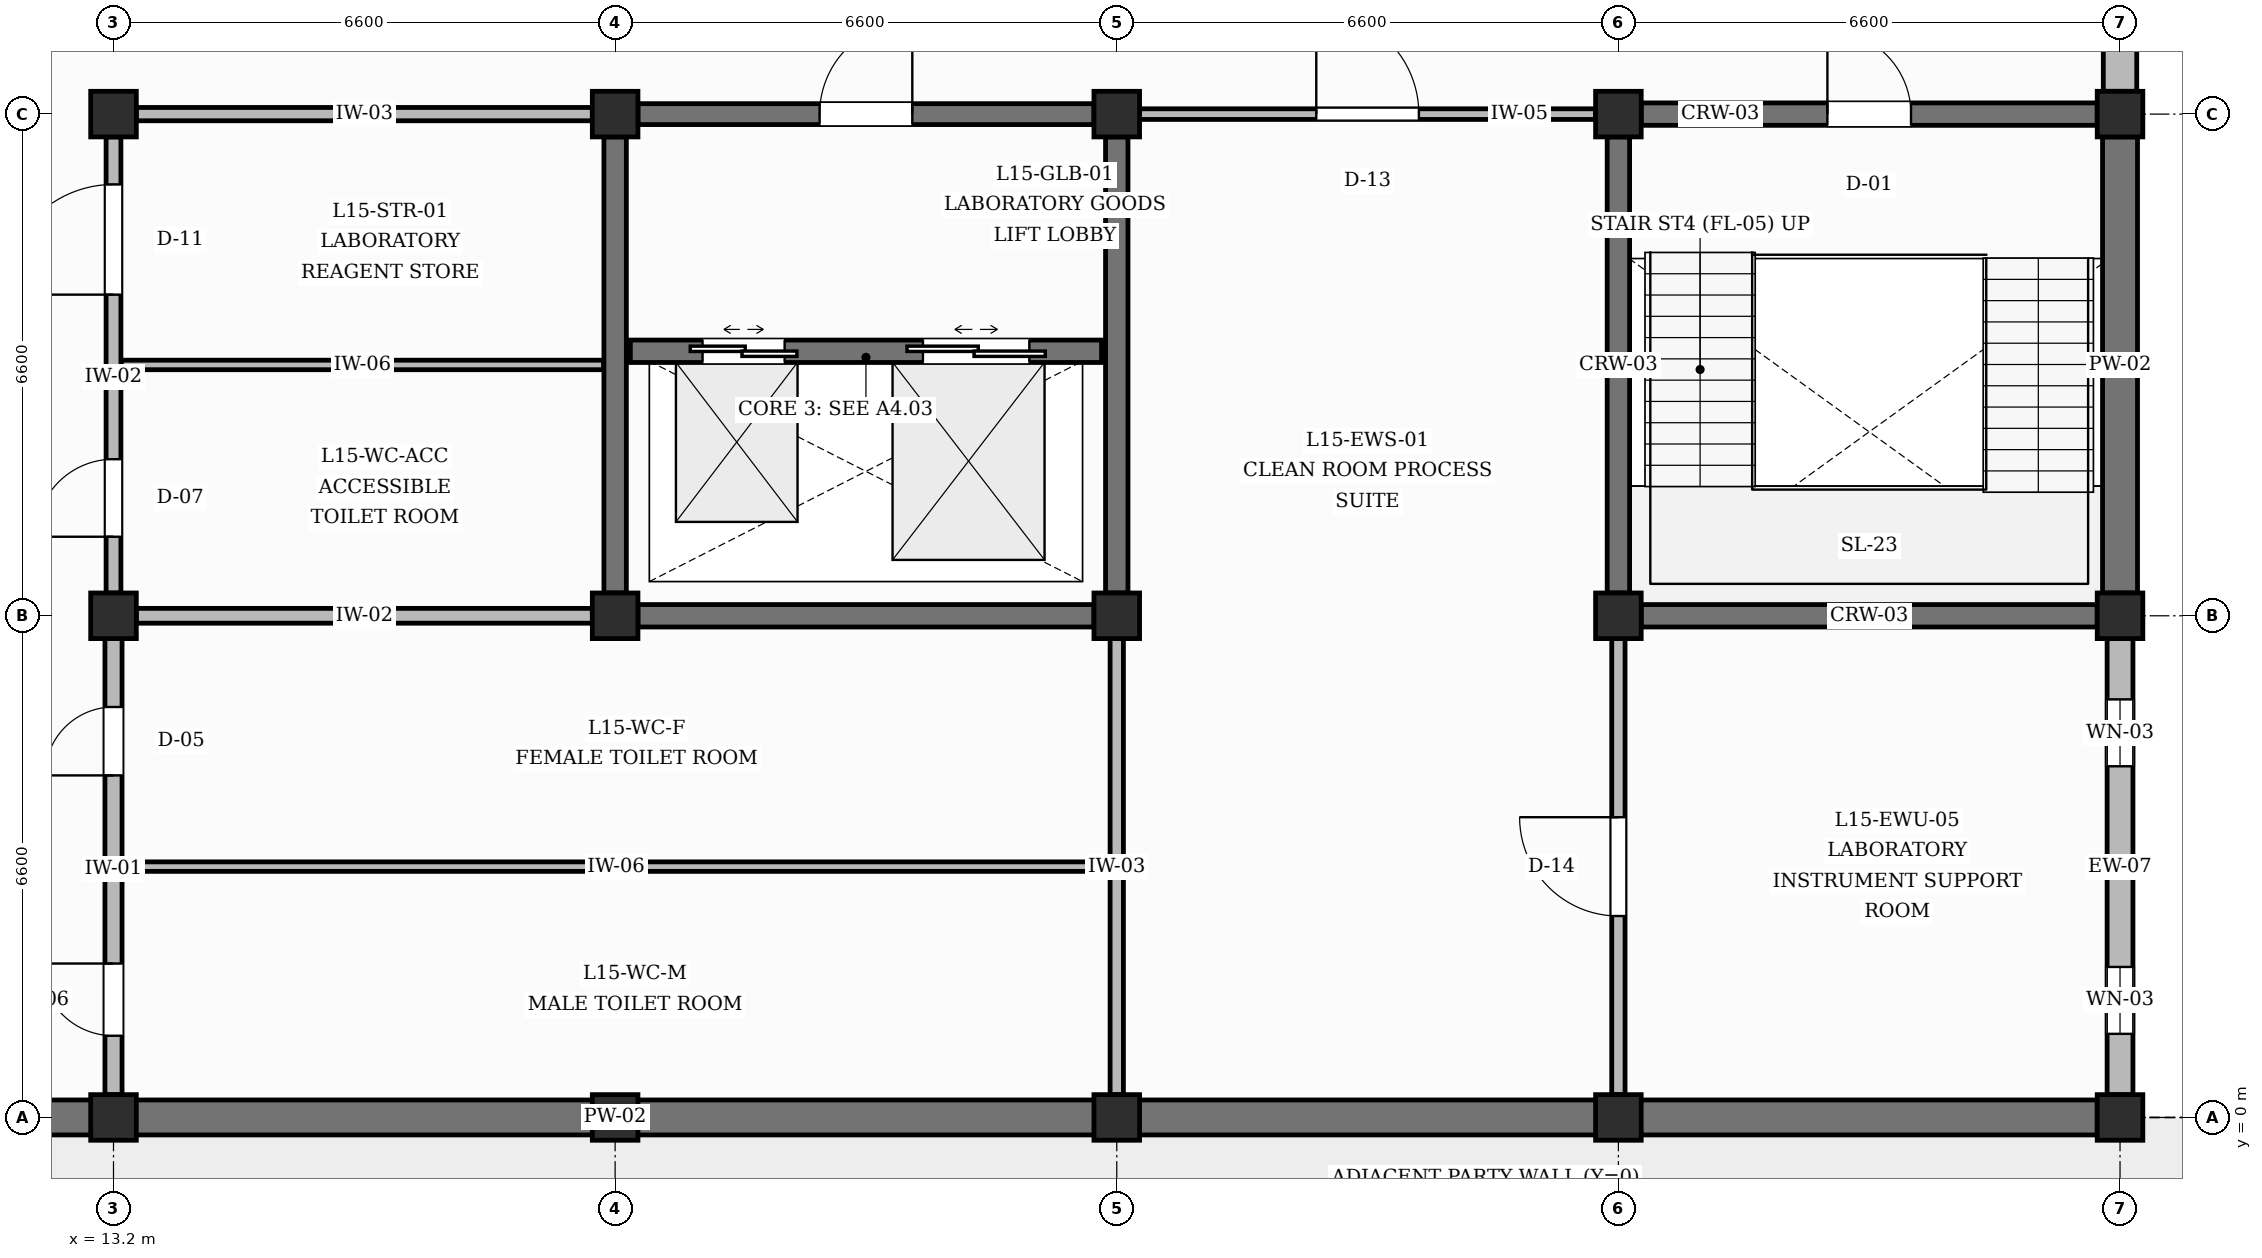
"""IFC4 building model, lengths in metres.
Left out: names, types, materials, properties, quantities, classifications, styles, units other than length and angle.
Written with IfcOpenShell. Run it as: python <this file> out.ifc"""

import sys

from ifc_helpers import new_model, si_unit, direction, frame, frame_2d, origin, origin_2d, place, context, subcontext, project, spatial, rectangle, extrude, element, fill, save


model = new_model("IFC4")
c1 = context("Model", 3, precision=1e-05, world=origin(), true_north=direction((0.0, 1.0)))
c2 = subcontext(c1, "Body", "Model", "MODEL_VIEW")
j1 = project(units=[si_unit("LENGTHUNIT", "METRE"), si_unit("PLANEANGLEUNIT", "RADIAN")], contexts=[c1])
p1 = place(None, origin())
s1 = spatial("IfcSite", under=j1, at=p1, CompositionType="ELEMENT")
p2 = place(p1, origin())
s2 = spatial("IfcBuilding", under=s1, at=p2, CompositionType="ELEMENT")
p3 = place(p2, frame((0.0, 0.0, 64.8)))
s3 = spatial("IfcBuildingStorey", under=s2, at=p3, CompositionType="ELEMENT", Elevation=64.8)
for number, where, z_axis, x_axis in (
    (1, (13.2, 0.0, 0.0), (0.0, 0.0, 1.0), (1.0, 0.0, 0.0)),
    (2, (13.2, 6.6, 0.0), (0.0, 0.0, 1.0), (1.0, 0.0, 0.0)),
    (3, (13.2, 13.2, 0.0), (0.0, 0.0, 1.0), (1.0, 0.0, 0.0)),
    (4, (19.8, 0.0, 0.0), (0.0, 0.0, 1.0), (1.0, 0.0, 0.0)),
    (5, (19.8, 6.6, 0.0), (0.0, 0.0, 1.0), (1.0, 0.0, 0.0)),
    (6, (19.8, 13.2, 0.0), (0.0, 0.0, 1.0), (1.0, 0.0, 0.0)),
    (7, (26.4, 0.0, 0.0), (0.0, 0.0, 1.0), (1.0, 0.0, 0.0)),
    (8, (26.4, 6.6, 0.0), (0.0, 0.0, 1.0), (1.0, 0.0, 0.0)),
    (9, (26.4, 13.2, 0.0), (0.0, 0.0, 1.0), (1.0, 0.0, 0.0)),
    (10, (33.0, 0.0, 0.0), (0.0, 0.0, 1.0), (1.0, 0.0, 0.0)),
    (11, (33.0, 6.6, 0.0), (0.0, 0.0, 1.0), (1.0, 0.0, 0.0)),
    (12, (33.0, 13.2, 0.0), (0.0, 0.0, 1.0), (1.0, 0.0, 0.0)),
    (13, (39.6, 0.0, 0.0), (0.0, 0.0, 1.0), (1.0, 0.0, 0.0)),
    (14, (39.6, 6.6, 0.0), (0.0, 0.0, 1.0), (1.0, 0.0, 0.0)),
    (15, (39.6, 13.2, 0.0), (0.0, 0.0, 1.0), (1.0, 0.0, 0.0)),
):
    element("IfcColumn", number, at=place(p3, frame(where, z_axis=z_axis, x_axis=x_axis)), inside=s3, PredefinedType="COLUMN", context=c2, shape_type="SweptSolid", body=[
        extrude(rectangle(XDim=0.6, YDim=0.6, at=origin_2d()), origin(), (0.0, 0.0, 1.0), 4.2),
    ])
for number, where, z_axis, x_axis in (
    (16, (6.9, 0.0, 0.0), (0.0, 0.0, 1.0), (1.0, 0.0, 0.0)),
    (17, (13.5, 0.0, 0.0), (0.0, 0.0, 1.0), (1.0, 0.0, 0.0)),
    (18, (20.1, 0.0, 0.0), (0.0, 0.0, 1.0), (1.0, 0.0, 0.0)),
    (19, (26.7, 0.0, 0.0), (0.0, 0.0, 1.0), (1.0, 0.0, 0.0)),
    (20, (33.3, 0.0, 0.0), (0.0, 0.0, 1.0), (1.0, 0.0, 0.0)),
):
    element("IfcWall", number, at=place(p3, frame(where, z_axis=z_axis, x_axis=x_axis)), inside=s3, PredefinedType="SOLIDWALL", context=c2, shape_type="SweptSolid", body=[
        extrude(rectangle(XDim=6.0, YDim=0.46, at=frame_2d((3.0, 0.0))), origin(), (0.0, 0.0, 1.0), 3.3),
    ])
p4 = place(p3, frame((39.6, 0.3, 0.0), z_axis=(0.0, 0.0, 1.0), x_axis=(0.0, 1.0, 0.0)))
e21 = element("IfcWall", 21, at=p4, inside=s3, PredefinedType="SOLIDWALL", context=c2, shape_type="SweptSolid", body=[
    extrude(rectangle(XDim=6.0, YDim=0.34, at=frame_2d((3.0, 0.0))), origin(), (0.0, 0.0, 1.0), 3.3),
])
p5 = place(p4, frame((0.8, 0.0, 0.95)))
e22 = element("IfcOpeningElement", 22, at=p5, cuts=e21, PredefinedType="OPENING", context=c2, shape_type="SweptSolid", body=[
    extrude(rectangle(XDim=0.88, YDim=1.74, at=frame_2d((0.44, 0.87))), frame((0.0, 0.18, 0.0), z_axis=(0.0, -1.0, 0.0), x_axis=(1.0, 0.0, 0.0)), (0.0, 0.0, 1.0), 0.36),
])
p6 = place(p4, frame((4.32, 0.0, 0.95)))
e23 = element("IfcOpeningElement", 23, at=p6, cuts=e21, PredefinedType="OPENING", context=c2, shape_type="SweptSolid", body=[
    extrude(rectangle(XDim=0.88, YDim=1.74, at=frame_2d((0.44, 0.87))), frame((0.0, 0.18, 0.0), z_axis=(0.0, -1.0, 0.0), x_axis=(1.0, 0.0, 0.0)), (0.0, 0.0, 1.0), 0.36),
])
p7 = place(p3, frame((39.6, 6.9, 0.0), z_axis=(0.0, 0.0, 1.0), x_axis=(0.0, 1.0, 0.0)))
e24 = element("IfcWall", 24, at=p7, inside=s3, PredefinedType="SOLIDWALL", context=c2, shape_type="SweptSolid", body=[
    extrude(rectangle(XDim=6.0, YDim=0.46, at=frame_2d((3.0, 0.0))), origin(), (0.0, 0.0, 1.0), 3.3),
])
p8 = place(p3, frame((39.6, 13.5, 0.0), z_axis=(0.0, 0.0, 1.0), x_axis=(0.0, 1.0, 0.0)))
e25 = element("IfcWall", 25, at=p8, inside=s3, PredefinedType="SOLIDWALL", context=c2, shape_type="SweptSolid", body=[
    extrude(rectangle(XDim=6.0, YDim=0.44, at=frame_2d((3.0, 0.0))), origin(), (0.0, 0.0, 1.0), 3.3),
])
p9 = place(p8, frame((0.8, 0.0, 0.95)))
e26 = element("IfcOpeningElement", 26, at=p9, cuts=e25, PredefinedType="OPENING", context=c2, shape_type="SweptSolid", body=[
    extrude(rectangle(XDim=0.88, YDim=1.96, at=frame_2d((0.44, 0.98))), frame((0.0, 0.23, 0.0), z_axis=(0.0, -1.0, 0.0), x_axis=(1.0, 0.0, 0.0)), (0.0, 0.0, 1.0), 0.46),
])
p10 = place(p8, frame((4.32, 0.0, 0.95)))
e27 = element("IfcOpeningElement", 27, at=p10, cuts=e25, PredefinedType="OPENING", context=c2, shape_type="SweptSolid", body=[
    extrude(rectangle(XDim=0.88, YDim=1.96, at=frame_2d((0.44, 0.98))), frame((0.0, 0.23, 0.0), z_axis=(0.0, -1.0, 0.0), x_axis=(1.0, 0.0, 0.0)), (0.0, 0.0, 1.0), 0.46),
])
p11 = place(p3, frame((33.3, 6.6, 0.0), z_axis=(0.0, 0.0, 1.0), x_axis=(1.0, 0.0, 0.0)))
e28 = element("IfcWall", 28, at=p11, inside=s3, PredefinedType="SHEAR", context=c2, shape_type="SweptSolid", body=[
    extrude(rectangle(XDim=6.0, YDim=0.295, at=frame_2d((3.0, 0.0))), origin(), (0.0, 0.0, 1.0), 3.3),
])
p12 = place(p3, frame((33.3, 13.2, 0.0), z_axis=(0.0, 0.0, 1.0), x_axis=(1.0, 0.0, 0.0)))
e29 = element("IfcWall", 29, at=p12, inside=s3, PredefinedType="SHEAR", context=c2, shape_type="SweptSolid", body=[
    extrude(rectangle(XDim=6.0, YDim=0.295, at=frame_2d((3.0, 0.0))), origin(), (0.0, 0.0, 1.0), 3.3),
])
p13 = place(p12, frame((2.45, 0.0, 0.0)))
e30 = element("IfcOpeningElement", 30, at=p13, cuts=e29, PredefinedType="OPENING", context=c2, shape_type="SweptSolid", body=[
    extrude(rectangle(XDim=1.1, YDim=2.15, at=frame_2d((0.55, 1.075))), frame((0.0, 0.157, 0.0), z_axis=(0.0, -1.0, 0.0), x_axis=(1.0, 0.0, 0.0)), (0.0, 0.0, 1.0), 0.315),
])
for number, where, z_axis, x_axis in (
    (31, (33.0, 6.9, 0.0), (0.0, 0.0, 1.0), (0.0, 1.0, 0.0)),
    (32, (20.1, 6.6, 0.0), (0.0, 0.0, 1.0), (1.0, 0.0, 0.0)),
    (33, (19.8, 6.9, 0.0), (0.0, 0.0, 1.0), (0.0, 1.0, 0.0)),
    (34, (26.4, 6.9, 0.0), (0.0, 0.0, 1.0), (0.0, 1.0, 0.0)),
):
    element("IfcWall", number, at=place(p3, frame(where, z_axis=z_axis, x_axis=x_axis)), inside=s3, PredefinedType="SHEAR", context=c2, shape_type="SweptSolid", body=[
        extrude(rectangle(XDim=6.0, YDim=0.295, at=frame_2d((3.0, 0.0))), origin(), (0.0, 0.0, 1.0), 3.3),
    ])
p14 = place(p3, frame((20.1, 13.2, 0.0), z_axis=(0.0, 0.0, 1.0), x_axis=(1.0, 0.0, 0.0)))
e35 = element("IfcWall", 35, at=p14, inside=s3, PredefinedType="SHEAR", context=c2, shape_type="SweptSolid", body=[
    extrude(rectangle(XDim=6.0, YDim=0.275, at=frame_2d((3.0, 0.0))), origin(), (0.0, 0.0, 1.0), 3.3),
])
p15 = place(p14, frame((2.39, 0.0, 0.0)))
e36 = element("IfcOpeningElement", 36, at=p15, cuts=e35, PredefinedType="OPENING", context=c2, shape_type="SweptSolid", body=[
    extrude(rectangle(XDim=1.22, YDim=2.15, at=frame_2d((0.61, 1.075))), frame((0.0, 0.147, 0.0), z_axis=(0.0, -1.0, 0.0), x_axis=(1.0, 0.0, 0.0)), (0.0, 0.0, 1.0), 0.295),
])
p16 = place(p3, frame((20.0, 10.08, 0.0), z_axis=(0.0, 0.0, 1.0), x_axis=(1.0, 0.0, 0.0)))
e37 = element("IfcWall", 37, at=p16, inside=s3, PredefinedType="SHEAR", context=c2, shape_type="SweptSolid", body=[
    extrude(rectangle(XDim=6.2, YDim=0.295, at=frame_2d((3.1, 0.0))), origin(), (0.0, 0.0, 1.0), 3.9),
])
p17 = place(p16, frame((0.95, 0.0, 0.0)))
e38 = element("IfcOpeningElement", 38, at=p17, cuts=e37, PredefinedType="OPENING", context=c2, shape_type="SweptSolid", body=[
    extrude(rectangle(XDim=1.08, YDim=2.15, at=frame_2d((0.54, 1.075))), frame((0.0, 0.157, 0.0), z_axis=(0.0, -1.0, 0.0), x_axis=(1.0, 0.0, 0.0)), (0.0, 0.0, 1.0), 0.315),
])
p18 = place(p16, frame((3.85, 0.0, 0.0)))
e39 = element("IfcOpeningElement", 39, at=p18, cuts=e37, PredefinedType="OPENING", context=c2, shape_type="SweptSolid", body=[
    extrude(rectangle(XDim=1.4, YDim=2.35, at=frame_2d((0.7, 1.175))), frame((0.0, 0.157, 0.0), z_axis=(0.0, -1.0, 0.0), x_axis=(1.0, 0.0, 0.0)), (0.0, 0.0, 1.0), 0.315),
])
p19 = place(p3, frame((13.2, 0.3, 0.0), z_axis=(0.0, 0.0, 1.0), x_axis=(0.0, 1.0, 0.0)))
e40 = element("IfcWall", 40, at=p19, inside=s3, PredefinedType="PARTITIONING", context=c2, shape_type="SweptSolid", body=[
    extrude(rectangle(XDim=6.0, YDim=0.225, at=frame_2d((3.0, 0.0))), origin(), (0.0, 0.0, 1.0), 3.3),
])
p20 = place(p19, frame((0.775, 0.0, 0.0)))
e41 = element("IfcOpeningElement", 41, at=p20, cuts=e40, PredefinedType="OPENING", context=c2, shape_type="SweptSolid", body=[
    extrude(rectangle(XDim=0.95, YDim=2.1, at=frame_2d((0.475, 1.05))), frame((0.0, 0.123, 0.0), z_axis=(0.0, -1.0, 0.0), x_axis=(1.0, 0.0, 0.0)), (0.0, 0.0, 1.0), 0.245),
])
p21 = place(p19, frame((4.2, 0.0, 0.0)))
e42 = element("IfcOpeningElement", 42, at=p21, cuts=e40, PredefinedType="OPENING", context=c2, shape_type="SweptSolid", body=[
    extrude(rectangle(XDim=0.9, YDim=2.1, at=frame_2d((0.45, 1.05))), frame((0.0, 0.123, 0.0), z_axis=(0.0, -1.0, 0.0), x_axis=(1.0, 0.0, 0.0)), (0.0, 0.0, 1.0), 0.245),
])
p22 = place(p3, frame((26.4, 0.3, 0.0), z_axis=(0.0, 0.0, 1.0), x_axis=(0.0, 1.0, 0.0)))
e43 = element("IfcWall", 43, at=p22, inside=s3, PredefinedType="PARTITIONING", context=c2, shape_type="SweptSolid", body=[
    extrude(rectangle(XDim=6.0, YDim=0.175, at=frame_2d((3.0, 0.0))), origin(), (0.0, 0.0, 1.0), 3.3),
])
p23 = place(p3, frame((13.5, 6.6, 0.0), z_axis=(0.0, 0.0, 1.0), x_axis=(1.0, 0.0, 0.0)))
e44 = element("IfcWall", 44, at=p23, inside=s3, PredefinedType="PARTITIONING", context=c2, shape_type="SweptSolid", body=[
    extrude(rectangle(XDim=6.0, YDim=0.195, at=frame_2d((3.0, 0.0))), origin(), (0.0, 0.0, 1.0), 3.3),
])
p24 = place(p3, frame((13.2, 6.9, 0.0), z_axis=(0.0, 0.0, 1.0), x_axis=(0.0, 1.0, 0.0)))
e45 = element("IfcWall", 45, at=p24, inside=s3, PredefinedType="PARTITIONING", context=c2, shape_type="SweptSolid", body=[
    extrude(rectangle(XDim=6.0, YDim=0.195, at=frame_2d((3.0, 0.0))), origin(), (0.0, 0.0, 1.0), 3.3),
])
p25 = place(p24, frame((0.74, 0.0, 0.0)))
e46 = element("IfcOpeningElement", 46, at=p25, cuts=e45, PredefinedType="OPENING", context=c2, shape_type="SweptSolid", body=[
    extrude(rectangle(XDim=1.02, YDim=2.15, at=frame_2d((0.51, 1.075))), frame((0.0, 0.107, 0.0), z_axis=(0.0, -1.0, 0.0), x_axis=(1.0, 0.0, 0.0)), (0.0, 0.0, 1.0), 0.215),
])
p26 = place(p24, frame((3.925, 0.0, 0.0)))
e47 = element("IfcOpeningElement", 47, at=p26, cuts=e45, PredefinedType="OPENING", context=c2, shape_type="SweptSolid", body=[
    extrude(rectangle(XDim=1.45, YDim=2.25, at=frame_2d((0.725, 1.125))), frame((0.0, 0.107, 0.0), z_axis=(0.0, -1.0, 0.0), x_axis=(1.0, 0.0, 0.0)), (0.0, 0.0, 1.0), 0.215),
])
p27 = place(p3, frame((13.5, 13.2, 0.0), z_axis=(0.0, 0.0, 1.0), x_axis=(1.0, 0.0, 0.0)))
e48 = element("IfcWall", 48, at=p27, inside=s3, PredefinedType="PARTITIONING", context=c2, shape_type="SweptSolid", body=[
    extrude(rectangle(XDim=6.0, YDim=0.175, at=frame_2d((3.0, 0.0))), origin(), (0.0, 0.0, 1.0), 3.3),
])
p28 = place(p3, frame((33.0, 0.3, 0.0), z_axis=(0.0, 0.0, 1.0), x_axis=(0.0, 1.0, 0.0)))
e49 = element("IfcWall", 49, at=p28, inside=s3, PredefinedType="PARTITIONING", context=c2, shape_type="SweptSolid", body=[
    extrude(rectangle(XDim=6.0, YDim=0.175, at=frame_2d((3.0, 0.0))), origin(), (0.0, 0.0, 1.0), 3.3),
])
p29 = place(p28, frame((2.35, 0.0, 0.0)))
e50 = element("IfcOpeningElement", 50, at=p29, cuts=e49, PredefinedType="OPENING", context=c2, shape_type="SweptSolid", body=[
    extrude(rectangle(XDim=1.3, YDim=2.3, at=frame_2d((0.65, 1.15))), frame((0.0, 0.097, 0.0), z_axis=(0.0, -1.0, 0.0), x_axis=(1.0, 0.0, 0.0)), (0.0, 0.0, 1.0), 0.195),
])
p30 = place(p3, frame((26.7, 13.2, 0.0), z_axis=(0.0, 0.0, 1.0), x_axis=(1.0, 0.0, 0.0)))
e51 = element("IfcWall", 51, at=p30, inside=s3, PredefinedType="PARTITIONING", context=c2, shape_type="SweptSolid", body=[
    extrude(rectangle(XDim=6.0, YDim=0.14, at=frame_2d((3.0, 0.0))), origin(), (0.0, 0.0, 1.0), 3.3),
])
p31 = place(p30, frame((2.325, 0.0, 0.0)))
e52 = element("IfcOpeningElement", 52, at=p31, cuts=e51, PredefinedType="OPENING", context=c2, shape_type="SweptSolid", body=[
    extrude(rectangle(XDim=1.35, YDim=2.3, at=frame_2d((0.675, 1.15))), frame((0.0, 0.08, 0.0), z_axis=(0.0, -1.0, 0.0), x_axis=(1.0, 0.0, 0.0)), (0.0, 0.0, 1.0), 0.16),
])
p32 = place(p3, frame((13.317, 3.3, 0.0), z_axis=(0.0, 0.0, 1.0), x_axis=(1.0, 0.0, 0.0)))
e53 = element("IfcWall", 53, at=p32, inside=s3, PredefinedType="PARTITIONING", context=c2, shape_type="SweptSolid", body=[
    extrude(rectangle(XDim=12.99, YDim=0.125, at=frame_2d((6.495, 0.0))), origin(), (0.0, 0.0, 1.0), 3.9),
])
p33 = place(p3, frame((13.302, 9.9, 0.0), z_axis=(0.0, 0.0, 1.0), x_axis=(1.0, 0.0, 0.0)))
e54 = element("IfcWall", 54, at=p33, inside=s3, PredefinedType="PARTITIONING", context=c2, shape_type="SweptSolid", body=[
    extrude(rectangle(XDim=6.345, YDim=0.125, at=frame_2d((3.172, 0.0))), origin(), (0.0, 0.0, 1.0), 3.9),
])
p34 = place(p5, origin())
e55 = element("IfcWindow", 55, at=p34, inside=s3, PartitioningType="SINGLE_PANEL", PredefinedType="WINDOW", context=c2, shape_type="SweptSolid", body=[
    extrude(rectangle(XDim=0.88, YDim=1.74, at=frame_2d((0.44, 0.87))), frame((0.0, 0.03, 0.0), z_axis=(0.0, -1.0, 0.0), x_axis=(1.0, 0.0, 0.0)), (0.0, 0.0, 1.0), 0.06),
])
fill(e22, e55)
p35 = place(p6, origin())
e56 = element("IfcWindow", 56, at=p35, inside=s3, PartitioningType="SINGLE_PANEL", PredefinedType="WINDOW", context=c2, shape_type="SweptSolid", body=[
    extrude(rectangle(XDim=0.88, YDim=1.74, at=frame_2d((0.44, 0.87))), frame((0.0, 0.03, 0.0), z_axis=(0.0, -1.0, 0.0), x_axis=(1.0, 0.0, 0.0)), (0.0, 0.0, 1.0), 0.06),
])
fill(e23, e56)
p36 = place(p13, origin())
e57 = element("IfcDoor", 57, at=p36, inside=s3, OperationType="SINGLE_SWING_LEFT", PredefinedType="DOOR", context=c2, shape_type="SweptSolid", body=[
    extrude(rectangle(XDim=1.1, YDim=2.15, at=frame_2d((0.55, 1.075))), frame((0.0, 0.025, 0.0), z_axis=(0.0, -1.0, 0.0), x_axis=(1.0, 0.0, 0.0)), (0.0, 0.0, 1.0), 0.05),
])
fill(e30, e57)
p37 = place(p17, origin())
e58 = element("IfcDoor", 58, at=p37, inside=s3, OperationType="DOUBLE_DOOR_SLIDING", PredefinedType="USERDEFINED", context=c2, shape_type="SweptSolid", body=[
    extrude(rectangle(XDim=1.08, YDim=2.15, at=frame_2d((0.54, 1.075))), frame((0.0, 0.025, 0.0), z_axis=(0.0, -1.0, 0.0), x_axis=(1.0, 0.0, 0.0)), (0.0, 0.0, 1.0), 0.05),
])
fill(e38, e58)
p38 = place(p18, origin())
e59 = element("IfcDoor", 59, at=p38, inside=s3, OperationType="DOUBLE_DOOR_SLIDING", PredefinedType="USERDEFINED", context=c2, shape_type="SweptSolid", body=[
    extrude(rectangle(XDim=1.4, YDim=2.35, at=frame_2d((0.7, 1.175))), frame((0.0, 0.025, 0.0), z_axis=(0.0, -1.0, 0.0), x_axis=(1.0, 0.0, 0.0)), (0.0, 0.0, 1.0), 0.05),
])
fill(e39, e59)
p39 = place(p15, origin())
e60 = element("IfcDoor", 60, at=p39, inside=s3, OperationType="SINGLE_SWING_RIGHT", PredefinedType="DOOR", context=c2, shape_type="SweptSolid", body=[
    extrude(rectangle(XDim=1.22, YDim=2.15, at=frame_2d((0.61, 1.075))), frame((0.0, 0.025, 0.0), z_axis=(0.0, -1.0, 0.0), x_axis=(1.0, 0.0, 0.0)), (0.0, 0.0, 1.0), 0.05),
])
fill(e36, e60)
p40 = place(p20, origin())
e61 = element("IfcDoor", 61, at=p40, inside=s3, OperationType="SINGLE_SWING_RIGHT", PredefinedType="DOOR", context=c2, shape_type="SweptSolid", body=[
    extrude(rectangle(XDim=0.95, YDim=2.1, at=frame_2d((0.475, 1.05))), frame((0.0, 0.025, 0.0), z_axis=(0.0, -1.0, 0.0), x_axis=(1.0, 0.0, 0.0)), (0.0, 0.0, 1.0), 0.05),
])
fill(e41, e61)
p41 = place(p21, origin())
e62 = element("IfcDoor", 62, at=p41, inside=s3, OperationType="SINGLE_SWING_LEFT", PredefinedType="DOOR", context=c2, shape_type="SweptSolid", body=[
    extrude(rectangle(XDim=0.9, YDim=2.1, at=frame_2d((0.45, 1.05))), frame((0.0, 0.025, 0.0), z_axis=(0.0, -1.0, 0.0), x_axis=(1.0, 0.0, 0.0)), (0.0, 0.0, 1.0), 0.05),
])
fill(e42, e62)
p42 = place(p25, origin())
e63 = element("IfcDoor", 63, at=p42, inside=s3, OperationType="SINGLE_SWING_LEFT", PredefinedType="DOOR", context=c2, shape_type="SweptSolid", body=[
    extrude(rectangle(XDim=1.02, YDim=2.15, at=frame_2d((0.51, 1.075))), frame((0.0, 0.025, 0.0), z_axis=(0.0, -1.0, 0.0), x_axis=(1.0, 0.0, 0.0)), (0.0, 0.0, 1.0), 0.05),
])
fill(e46, e63)
p43 = place(p26, origin())
e64 = element("IfcDoor", 64, at=p43, inside=s3, OperationType="SINGLE_SWING_LEFT", PredefinedType="DOOR", context=c2, shape_type="SweptSolid", body=[
    extrude(rectangle(XDim=1.45, YDim=2.25, at=frame_2d((0.725, 1.125))), frame((0.0, 0.025, 0.0), z_axis=(0.0, -1.0, 0.0), x_axis=(1.0, 0.0, 0.0)), (0.0, 0.0, 1.0), 0.05),
])
fill(e47, e64)
p44 = place(p31, origin())
e65 = element("IfcDoor", 65, at=p44, inside=s3, OperationType="SINGLE_SWING_LEFT", PredefinedType="DOOR", context=c2, shape_type="SweptSolid", body=[
    extrude(rectangle(XDim=1.35, YDim=2.3, at=frame_2d((0.675, 1.15))), frame((0.0, 0.025, 0.0), z_axis=(0.0, -1.0, 0.0), x_axis=(1.0, 0.0, 0.0)), (0.0, 0.0, 1.0), 0.05),
])
fill(e52, e65)
p45 = place(p29, origin())
e66 = element("IfcDoor", 66, at=p45, inside=s3, OperationType="SINGLE_SWING_RIGHT", PredefinedType="DOOR", context=c2, shape_type="SweptSolid", body=[
    extrude(rectangle(XDim=1.3, YDim=2.3, at=frame_2d((0.65, 1.15))), frame((0.0, 0.025, 0.0), z_axis=(0.0, -1.0, 0.0), x_axis=(1.0, 0.0, 0.0)), (0.0, 0.0, 1.0), 0.05),
])
fill(e50, e66)
save(model, sys.argv[1])
